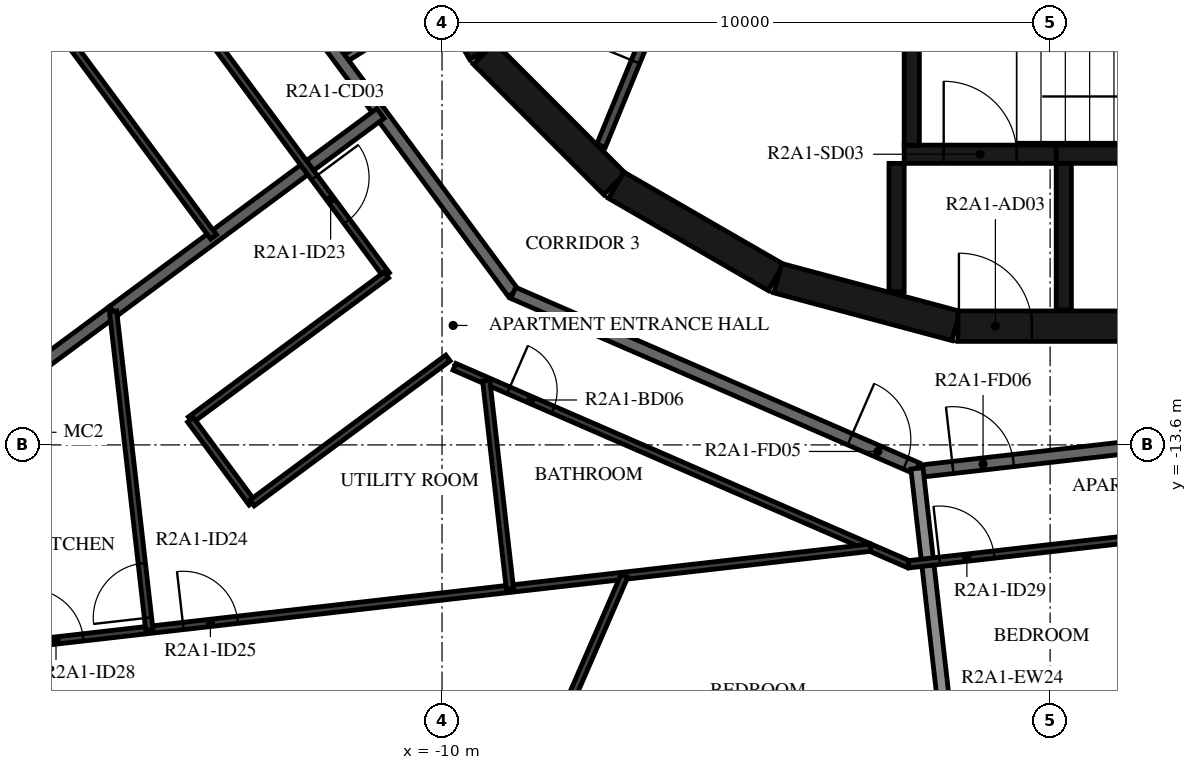
"""IFC4 building model, lengths in metres.
Left out: names, types, materials, properties, quantities, classifications, styles, units other than length and angle.
Written with IfcOpenShell. Run it as: python <this file> out.ifc"""

import sys

from ifc_helpers import new_model, si_unit, direction, frame, frame_2d, origin, place, context, subcontext, project, spatial, rectangle, extrude, element, fill, save


model = new_model("IFC4")
c1 = context("Model", 3, precision=1e-05, world=origin(), true_north=direction((0.0, 1.0)))
c2 = subcontext(c1, "Body", "Model", "MODEL_VIEW")
j1 = project(units=[si_unit("LENGTHUNIT", "METRE"), si_unit("PLANEANGLEUNIT", "RADIAN")], contexts=[c1])
p1 = place(None, origin())
s1 = spatial("IfcSite", under=j1, at=p1, CompositionType="ELEMENT")
p2 = place(p1, origin())
s2 = spatial("IfcBuilding", under=s1, at=p2, CompositionType="ELEMENT")
p3 = place(p2, frame((0.0, 0.0, 80.2)))
s3 = spatial("IfcBuildingStorey", under=s2, at=p3, CompositionType="ELEMENT", Elevation=80.2)
p4 = place(p3, frame((-10.845, -4.51, 0.0), z_axis=(0.0, 0.0, 1.0), x_axis=(0.500087131594, -0.865975092491, 0.0)))
e1 = element("IfcWall", 1, at=p4, inside=s3, PredefinedType="SHEAR", context=c2, shape_type="SweptSolid", body=[
    extrude(rectangle(XDim=3.033, YDim=0.5, at=frame_2d((1.516, 0.0))), origin(), (0.0, 0.0, 1.0), 3.12),
])
p5 = place(p3, frame((-9.308, -7.164, 0.0), z_axis=(0.0, 0.0, 1.0), x_axis=(0.707106781187, -0.707106781187, 0.0)))
e2 = element("IfcWall", 2, at=p5, inside=s3, PredefinedType="SHEAR", context=c2, shape_type="SweptSolid", body=[
    extrude(rectangle(XDim=3.032, YDim=0.5, at=frame_2d((1.516, 0.0))), origin(), (0.0, 0.0, 1.0), 3.12),
])
for number, where, z_axis, x_axis in (
    (3, (-7.137, -9.329, 0.0), (0.0, 0.0, 1.0), (0.866, -0.5, 0.0)),
    (4, (-4.479, -10.858, 0.0), (0.0, 0.0, 1.0), (0.966, -0.259, 0.0)),
):
    element("IfcWall", number, at=place(p3, frame(where, z_axis=z_axis, x_axis=x_axis)), inside=s3, PredefinedType="SHEAR", context=c2, shape_type="SweptSolid", body=[
        extrude(rectangle(XDim=3.033, YDim=0.5, at=frame_2d((1.516, 0.0))), origin(), (0.0, 0.0, 1.0), 3.12),
    ])
p6 = place(p3, frame((-1.516, -11.647, 0.0), z_axis=(0.0, 0.0, 1.0), x_axis=(1.0, 0.0, 0.0)))
e5 = element("IfcWall", 5, at=p6, inside=s3, PredefinedType="SHEAR", context=c2, shape_type="SweptSolid", body=[
    extrude(rectangle(XDim=3.033, YDim=0.5, at=frame_2d((1.516, 0.0))), origin(), (0.0, 0.0, 1.0), 3.12),
])
p7 = place(p6, frame((0.016, 0.0, 0.0)))
e6 = element("IfcOpeningElement", 6, at=p7, cuts=e5, PredefinedType="OPENING", context=c2, shape_type="SweptSolid", body=[
    extrude(rectangle(XDim=1.2, YDim=2.1, at=frame_2d((0.6, 1.05))), frame((0.0, 0.26, 0.0), z_axis=(0.0, -1.0, 0.0), x_axis=(1.0, 0.0, 0.0)), (0.0, 0.0, 1.0), 0.52),
])
p8 = place(p3, frame((-2.275, -8.67, 0.0), z_axis=(0.0, 0.0, 1.0), x_axis=(0.0, 1.0, 0.0)))
e7 = element("IfcWall", 7, at=p8, inside=s3, PredefinedType="SHEAR", context=c2, shape_type="SweptSolid", body=[
    extrude(rectangle(XDim=3.32, YDim=0.25, at=frame_2d((1.66, 0.0))), origin(), (0.0, 0.0, 1.0), 3.12),
])
p9 = place(p3, frame((0.1, -8.82, 0.0), z_axis=(0.0, 0.0, 1.0), x_axis=(1.0, 0.0, 0.0)))
e8 = element("IfcWall", 8, at=p9, inside=s3, PredefinedType="SHEAR", context=c2, shape_type="SweptSolid", body=[
    extrude(rectangle(XDim=4.55, YDim=0.3, at=frame_2d((2.275, 0.0))), origin(), (0.0, 0.0, 1.0), 3.12),
])
p10 = place(p3, frame((-2.4, -8.82, 0.0), z_axis=(0.0, 0.0, 1.0), x_axis=(1.0, 0.0, 0.0)))
e9 = element("IfcWall", 9, at=p10, inside=s3, PredefinedType="SHEAR", context=c2, shape_type="SweptSolid", body=[
    extrude(rectangle(XDim=2.5, YDim=0.3, at=frame_2d((1.25, 0.0))), origin(), (0.0, 0.0, 1.0), 3.12),
])
p11 = place(p10, frame((0.65, 0.0, 0.0)))
e10 = element("IfcOpeningElement", 10, at=p11, cuts=e9, PredefinedType="OPENING", context=c2, shape_type="SweptSolid", body=[
    extrude(rectangle(XDim=1.2, YDim=2.1, at=frame_2d((0.6, 1.05))), frame((0.0, 0.16, 0.0), z_axis=(0.0, -1.0, 0.0), x_axis=(1.0, 0.0, 0.0)), (0.0, 0.0, 1.0), 0.32),
])
p12 = place(p3, frame((-2.525, -8.97, 0.0), z_axis=(0.0, 0.0, 1.0), x_axis=(0.0, -1.0, 0.0)))
e11 = element("IfcWall", 11, at=p12, inside=s3, PredefinedType="SHEAR", context=c2, shape_type="SweptSolid", body=[
    extrude(rectangle(XDim=2.11, YDim=0.25, at=frame_2d((1.055, 0.0))), origin(), (0.0, 0.0, 1.0), 3.12),
])
p13 = place(p3, frame((0.225, -8.97, 0.0), z_axis=(0.0, 0.0, 1.0), x_axis=(0.0, -1.0, 0.0)))
e12 = element("IfcWall", 12, at=p13, inside=s3, PredefinedType="SHEAR", context=c2, shape_type="SweptSolid", body=[
    extrude(rectangle(XDim=2.41, YDim=0.25, at=frame_2d((1.205, 0.0))), origin(), (0.0, 0.0, 1.0), 3.12),
])
p14 = place(p3, frame((-7.385, -8.681, 0.0), z_axis=(0.0, 0.0, 1.0), x_axis=(0.379804590409, 0.925066739811, 0.0)))
e13 = element("IfcWall", 13, at=p14, inside=s3, PredefinedType="PARTITIONING", context=c2, shape_type="SweptSolid", body=[
    extrude(rectangle(XDim=3.885, YDim=0.15, at=frame_2d((1.942, 0.0))), origin(), (0.0, 0.0, 1.0), 3.12),
])
p15 = place(p14, frame((1.493, 0.0, 0.0)))
e14 = element("IfcOpeningElement", 14, at=p15, cuts=e13, PredefinedType="OPENING", context=c2, shape_type="SweptSolid", body=[
    extrude(rectangle(XDim=0.9, YDim=2.1, at=frame_2d((0.45, 1.05))), frame((0.0, 0.085, 0.0), z_axis=(0.0, -1.0, 0.0), x_axis=(1.0, 0.0, 0.0)), (0.0, 0.0, 1.0), 0.17),
])
p16 = place(p3, frame((-11.654, -7.282, 0.0), z_axis=(0.0, 0.0, 1.0), x_axis=(0.848117698675, 0.529807860638, 0.0)))
e15 = element("IfcWall", 15, at=p16, inside=s3, PredefinedType="PARTITIONING", context=c2, shape_type="SweptSolid", body=[
    extrude(rectangle(XDim=1.838, YDim=0.12, at=frame_2d((0.919, 0.0))), origin(), (0.0, 0.0, 1.0), 3.12),
])
p17 = place(p16, frame((0.115, 0.0, 0.0)))
e16 = element("IfcOpeningElement", 16, at=p17, cuts=e15, PredefinedType="OPENING", context=c2, shape_type="SweptSolid", body=[
    extrude(rectangle(XDim=1.2, YDim=2.1, at=frame_2d((0.6, 1.05))), frame((0.0, 0.07, 0.0), z_axis=(0.0, -1.0, 0.0), x_axis=(1.0, 0.0, 0.0)), (0.0, 0.0, 1.0), 0.14),
])
p18 = place(p3, frame((-13.196, -5.198, 0.0), z_axis=(0.0, 0.0, 1.0), x_axis=(0.594805187394, -0.803869883159, 0.0)))
e17 = element("IfcWall", 17, at=p18, inside=s3, PredefinedType="STANDARD", context=c2, shape_type="SweptSolid", body=[
    extrude(rectangle(XDim=7.342, YDim=0.2, at=frame_2d((3.671, 0.0))), origin(), (0.0, 0.0, 1.0), 3.12),
])
p19 = place(p3, frame((-8.829, -11.1, 0.0), z_axis=(0.0, 0.0, 1.0), x_axis=(0.917063622491, -0.398740908742, 0.0)))
e18 = element("IfcWall", 18, at=p19, inside=s3, PredefinedType="STANDARD", context=c2, shape_type="SweptSolid", body=[
    extrude(rectangle(XDim=7.24, YDim=0.2, at=frame_2d((3.62, 0.0))), origin(), (0.0, 0.0, 1.0), 3.12),
])
p20 = place(p19, frame((6.04, 0.0, 0.0)))
e19 = element("IfcOpeningElement", 19, at=p20, cuts=e18, PredefinedType="OPENING", context=c2, shape_type="SweptSolid", body=[
    extrude(rectangle(XDim=1.0, YDim=2.1, at=frame_2d((0.5, 1.05))), frame((0.0, 0.11, 0.0), z_axis=(0.0, -1.0, 0.0), x_axis=(1.0, 0.0, 0.0)), (0.0, 0.0, 1.0), 0.22),
])
p21 = place(p3, frame((-2.096, -14.028, 0.0), z_axis=(0.0, 0.0, 1.0), x_axis=(0.993569170114, 0.113226782163, 0.0)))
e20 = element("IfcWall", 20, at=p21, inside=s3, PredefinedType="STANDARD", context=c2, shape_type="SweptSolid", body=[
    extrude(rectangle(XDim=7.342, YDim=0.2, at=frame_2d((3.671, 0.0))), origin(), (0.0, 0.0, 1.0), 3.12),
])
p22 = place(p21, frame((0.5, 0.0, 0.0)))
e21 = element("IfcOpeningElement", 21, at=p22, cuts=e20, PredefinedType="OPENING", context=c2, shape_type="SweptSolid", body=[
    extrude(rectangle(XDim=1.0, YDim=2.1, at=frame_2d((0.5, 1.05))), frame((0.0, 0.11, 0.0), z_axis=(0.0, -1.0, 0.0), x_axis=(1.0, 0.0, 0.0)), (0.0, 0.0, 1.0), 0.22),
])
p23 = place(p3, frame((-15.41, -11.403, 0.0), z_axis=(0.0, 0.0, 1.0), x_axis=(0.803887568227, 0.594781285558, 0.0)))
e22 = element("IfcWall", 22, at=p23, inside=s3, PredefinedType="STANDARD", context=c2, shape_type="SweptSolid", body=[
    extrude(rectangle(XDim=5.47, YDim=0.2, at=frame_2d((2.735, 0.0))), origin(), (0.0, 0.0, 1.0), 3.12),
])
p24 = place(p3, frame((-16.649, -12.32, 0.0), z_axis=(0.0, 0.0, 1.0), x_axis=(0.803804030903, 0.594894175383, 0.0)))
e23 = element("IfcWall", 23, at=p24, inside=s3, PredefinedType="STANDARD", context=c2, shape_type="SweptSolid", body=[
    extrude(rectangle(XDim=1.542, YDim=0.2, at=frame_2d((0.771, 0.0))), origin(), (0.0, 0.0, 1.0), 3.12),
])
p25 = place(p3, frame((-1.555, -19.559, 0.0), z_axis=(0.0, 0.0, 1.0), x_axis=(-0.113221250863, 0.993569800443, 0.0)))
e24 = element("IfcWall", 24, at=p25, inside=s3, PredefinedType="STANDARD", context=c2, shape_type="SweptSolid", body=[
    extrude(rectangle(XDim=5.609, YDim=0.2, at=frame_2d((2.804, 0.0))), origin(), (0.0, 0.0, 1.0), 2.73),
])
p26 = place(p3, frame((-14.641, -5.767, 0.0), z_axis=(0.0, 0.0, 1.0), x_axis=(0.594825885962, -0.803854567313, 0.0)))
e25 = element("IfcWall", 25, at=p26, inside=s3, PredefinedType="PARTITIONING", context=c2, shape_type="SweptSolid", body=[
    extrude(rectangle(XDim=6.266, YDim=0.12, at=frame_2d((3.133, 0.0))), origin(), (0.0, 0.0, 1.0), 3.12),
])
p27 = place(p26, frame((4.273, 0.0, 0.0)))
e26 = element("IfcOpeningElement", 26, at=p27, cuts=e25, PredefinedType="OPENING", context=c2, shape_type="SweptSolid", body=[
    extrude(rectangle(XDim=0.9, YDim=2.1, at=frame_2d((0.45, 1.05))), frame((0.0, 0.07, 0.0), z_axis=(0.0, -1.0, 0.0), x_axis=(1.0, 0.0, 0.0)), (0.0, 0.0, 1.0), 0.14),
])
p28 = place(p3, frame((-18.084, -4.331, 0.0), z_axis=(0.0, 0.0, 1.0), x_axis=(0.594811782108, -0.803865003508, 0.0)))
e27 = element("IfcWall", 27, at=p28, inside=s3, PredefinedType="PARTITIONING", context=c2, shape_type="SweptSolid", body=[
    extrude(rectangle(XDim=7.276, YDim=0.12, at=frame_2d((3.638, 0.0))), origin(), (0.0, 0.0, 1.0), 3.12),
])
p29 = place(p3, frame((-10.914, -10.804, 0.0), z_axis=(0.0, 0.0, 1.0), x_axis=(-0.803864616889, -0.594812304609, 0.0)))
e28 = element("IfcWall", 28, at=p29, inside=s3, PredefinedType="PARTITIONING", context=c2, shape_type="SweptSolid", body=[
    extrude(rectangle(XDim=4.008, YDim=0.12, at=frame_2d((2.004, 0.0))), origin(), (0.0, 0.0, 1.0), 3.12),
])
p30 = place(p3, frame((-14.136, -13.188, 0.0), z_axis=(0.0, 0.0, 1.0), x_axis=(0.594863421241, -0.803826791087, 0.0)))
e29 = element("IfcWall", 29, at=p30, inside=s3, PredefinedType="PARTITIONING", context=c2, shape_type="SweptSolid", body=[
    extrude(rectangle(XDim=1.7, YDim=0.12, at=frame_2d((0.85, 0.0))), origin(), (0.0, 0.0, 1.0), 3.12),
])
p31 = place(p3, frame((-13.125, -14.555, 0.0), z_axis=(0.0, 0.0, 1.0), x_axis=(0.80389374229, 0.594772940799, 0.0)))
e30 = element("IfcWall", 30, at=p31, inside=s3, PredefinedType="PARTITIONING", context=c2, shape_type="SweptSolid", body=[
    extrude(rectangle(XDim=4.008, YDim=0.12, at=frame_2d((2.004, 0.0))), origin(), (0.0, 0.0, 1.0), 3.12),
])
p32 = place(p3, frame((-9.796, -12.315, 0.0), z_axis=(0.0, 0.0, 1.0), x_axis=(0.917059572812, -0.398750222463, 0.0)))
e31 = element("IfcWall", 31, at=p32, inside=s3, PredefinedType="PARTITIONING", context=c2, shape_type="SweptSolid", body=[
    extrude(rectangle(XDim=8.146, YDim=0.12, at=frame_2d((4.073, 0.0))), origin(), (0.0, 0.0, 1.0), 3.12),
])
p33 = place(p32, frame((0.969, 0.0, 0.0)))
e32 = element("IfcOpeningElement", 32, at=p33, cuts=e31, PredefinedType="OPENING", context=c2, shape_type="SweptSolid", body=[
    extrude(rectangle(XDim=0.8, YDim=2.1, at=frame_2d((0.4, 1.05))), frame((0.0, 0.07, 0.0), z_axis=(0.0, -1.0, 0.0), x_axis=(1.0, 0.0, 0.0)), (0.0, 0.0, 1.0), 0.14),
])
p34 = place(p3, frame((-2.326, -15.563, 0.0), z_axis=(0.0, 0.0, 1.0), x_axis=(0.993575068384, 0.113175012641, 0.0)))
e33 = element("IfcWall", 33, at=p34, inside=s3, PredefinedType="PARTITIONING", context=c2, shape_type="SweptSolid", body=[
    extrude(rectangle(XDim=3.799, YDim=0.12, at=frame_2d((1.899, 0.0))), origin(), (0.0, 0.0, 1.0), 3.12),
])
p35 = place(p34, frame((0.513, 0.0, 0.0)))
e34 = element("IfcOpeningElement", 34, at=p35, cuts=e33, PredefinedType="OPENING", context=c2, shape_type="SweptSolid", body=[
    extrude(rectangle(XDim=0.9, YDim=2.1, at=frame_2d((0.45, 1.05))), frame((0.0, 0.07, 0.0), z_axis=(0.0, -1.0, 0.0), x_axis=(1.0, 0.0, 0.0)), (0.0, 0.0, 1.0), 0.14),
])
p36 = place(p3, frame((-17.437, -16.94, 0.0), z_axis=(0.0, 0.0, 1.0), x_axis=(0.993573314119, 0.113190412448, 0.0)))
e35 = element("IfcWall", 35, at=p36, inside=s3, PredefinedType="PARTITIONING", context=c2, shape_type="SweptSolid", body=[
    extrude(rectangle(XDim=14.576, YDim=0.12, at=frame_2d((7.288, 0.0))), origin(), (0.0, 0.0, 1.0), 3.12),
])
p37 = place(p36, frame((3.201, 0.0, 0.0)))
e36 = element("IfcOpeningElement", 36, at=p37, cuts=e35, PredefinedType="OPENING", context=c2, shape_type="SweptSolid", body=[
    extrude(rectangle(XDim=0.9, YDim=2.1, at=frame_2d((0.45, 1.05))), frame((0.0, 0.07, 0.0), z_axis=(0.0, -1.0, 0.0), x_axis=(1.0, 0.0, 0.0)), (0.0, 0.0, 1.0), 0.14),
])
p38 = place(p36, frame((0.645, 0.0, 0.0)))
e37 = element("IfcOpeningElement", 37, at=p38, cuts=e35, PredefinedType="OPENING", context=c2, shape_type="SweptSolid", body=[
    extrude(rectangle(XDim=0.9, YDim=2.1, at=frame_2d((0.45, 1.05))), frame((0.0, 0.07, 0.0), z_axis=(0.0, -1.0, 0.0), x_axis=(1.0, 0.0, 0.0)), (0.0, 0.0, 1.0), 0.14),
])
p39 = place(p3, frame((-14.813, -16.641, 0.0), z_axis=(0.0, 0.0, 1.0), x_axis=(-0.113210971478, 0.993570971767, 0.0)))
e38 = element("IfcWall", 38, at=p39, inside=s3, PredefinedType="PARTITIONING", context=c2, shape_type="SweptSolid", body=[
    extrude(rectangle(XDim=5.273, YDim=0.12, at=frame_2d((2.636, 0.0))), origin(), (0.0, 0.0, 1.0), 3.12),
])
p40 = place(p39, frame((0.2, 0.0, 0.0)))
e39 = element("IfcOpeningElement", 39, at=p40, cuts=e38, PredefinedType="OPENING", context=c2, shape_type="SweptSolid", body=[
    extrude(rectangle(XDim=0.9, YDim=2.1, at=frame_2d((0.45, 1.05))), frame((0.0, 0.07, 0.0), z_axis=(0.0, -1.0, 0.0), x_axis=(1.0, 0.0, 0.0)), (0.0, 0.0, 1.0), 0.14),
])
p41 = place(p3, frame((-8.884, -15.966, 0.0), z_axis=(0.0, 0.0, 1.0), x_axis=(-0.113230836929, 0.993568708026, 0.0)))
e40 = element("IfcWall", 40, at=p41, inside=s3, PredefinedType="PARTITIONING", context=c2, shape_type="SweptSolid", body=[
    extrude(rectangle(XDim=3.446, YDim=0.12, at=frame_2d((1.723, 0.0))), origin(), (0.0, 0.0, 1.0), 3.12),
])
p42 = place(p3, frame((-9.026, -20.41, 0.0), z_axis=(0.0, 0.0, 1.0), x_axis=(0.398750711167, 0.917059360316, 0.0)))
e41 = element("IfcWall", 41, at=p42, inside=s3, PredefinedType="PARTITIONING", context=c2, shape_type="SweptSolid", body=[
    extrude(rectangle(XDim=5.081, YDim=0.12, at=frame_2d((2.54, 0.0))), origin(), (0.0, 0.0, 1.0), 3.12),
])
p43 = place(p42, frame((0.4, 0.0, 0.0)))
e42 = element("IfcOpeningElement", 42, at=p43, cuts=e41, PredefinedType="OPENING", context=c2, shape_type="SweptSolid", body=[
    extrude(rectangle(XDim=0.9, YDim=2.1, at=frame_2d((0.45, 1.05))), frame((0.0, 0.07, 0.0), z_axis=(0.0, -1.0, 0.0), x_axis=(1.0, 0.0, 0.0)), (0.0, 0.0, 1.0), 0.14),
])
p44 = place(p11, origin())
e43 = element("IfcDoor", 43, at=p44, inside=s3, OperationType="SINGLE_SWING_LEFT", PredefinedType="DOOR", context=c2, shape_type="SweptSolid", body=[
    extrude(rectangle(XDim=1.2, YDim=2.1, at=frame_2d((0.6, 1.05))), frame((0.0, 0.025, 0.0), z_axis=(0.0, -1.0, 0.0), x_axis=(1.0, 0.0, 0.0)), (0.0, 0.0, 1.0), 0.05),
])
fill(e10, e43)
p45 = place(p7, origin())
e44 = element("IfcDoor", 44, at=p45, inside=s3, OperationType="SINGLE_SWING_RIGHT", PredefinedType="DOOR", context=c2, shape_type="SweptSolid", body=[
    extrude(rectangle(XDim=1.2, YDim=2.1, at=frame_2d((0.6, 1.05))), frame((0.0, 0.025, 0.0), z_axis=(0.0, -1.0, 0.0), x_axis=(1.0, 0.0, 0.0)), (0.0, 0.0, 1.0), 0.05),
])
fill(e6, e44)
p46 = place(p15, origin())
e45 = element("IfcDoor", 45, at=p46, inside=s3, OperationType="SINGLE_SWING_LEFT", PredefinedType="DOOR", context=c2, shape_type="SweptSolid", body=[
    extrude(rectangle(XDim=0.9, YDim=2.1, at=frame_2d((0.45, 1.05))), frame((0.0, 0.025, 0.0), z_axis=(0.0, -1.0, 0.0), x_axis=(1.0, 0.0, 0.0)), (0.0, 0.0, 1.0), 0.05),
])
fill(e14, e45)
p47 = place(p20, origin())
e46 = element("IfcDoor", 46, at=p47, inside=s3, OperationType="SINGLE_SWING_LEFT", PredefinedType="DOOR", context=c2, shape_type="SweptSolid", body=[
    extrude(rectangle(XDim=1.0, YDim=2.1, at=frame_2d((0.5, 1.05))), frame((0.0, 0.025, 0.0), z_axis=(0.0, -1.0, 0.0), x_axis=(1.0, 0.0, 0.0)), (0.0, 0.0, 1.0), 0.05),
])
fill(e19, e46)
p48 = place(p27, origin())
e47 = element("IfcDoor", 47, at=p48, inside=s3, OperationType="SINGLE_SWING_LEFT", PredefinedType="DOOR", context=c2, shape_type="SweptSolid", body=[
    extrude(rectangle(XDim=0.9, YDim=2.1, at=frame_2d((0.45, 1.05))), frame((0.0, 0.025, 0.0), z_axis=(0.0, -1.0, 0.0), x_axis=(1.0, 0.0, 0.0)), (0.0, 0.0, 1.0), 0.05),
])
fill(e26, e47)
p49 = place(p33, origin())
e48 = element("IfcDoor", 48, at=p49, inside=s3, OperationType="SINGLE_SWING_LEFT", PredefinedType="DOOR", context=c2, shape_type="SweptSolid", body=[
    extrude(rectangle(XDim=0.8, YDim=2.1, at=frame_2d((0.4, 1.05))), frame((0.0, 0.025, 0.0), z_axis=(0.0, -1.0, 0.0), x_axis=(1.0, 0.0, 0.0)), (0.0, 0.0, 1.0), 0.05),
])
fill(e32, e48)
p50 = place(p40, origin())
e49 = element("IfcDoor", 49, at=p50, inside=s3, OperationType="SINGLE_SWING_LEFT", PredefinedType="DOOR", context=c2, shape_type="SweptSolid", body=[
    extrude(rectangle(XDim=0.9, YDim=2.1, at=frame_2d((0.45, 1.05))), frame((0.0, 0.025, 0.0), z_axis=(0.0, -1.0, 0.0), x_axis=(1.0, 0.0, 0.0)), (0.0, 0.0, 1.0), 0.05),
])
fill(e39, e49)
p51 = place(p37, origin())
e50 = element("IfcDoor", 50, at=p51, inside=s3, OperationType="SINGLE_SWING_LEFT", PredefinedType="DOOR", context=c2, shape_type="SweptSolid", body=[
    extrude(rectangle(XDim=0.9, YDim=2.1, at=frame_2d((0.45, 1.05))), frame((0.0, 0.025, 0.0), z_axis=(0.0, -1.0, 0.0), x_axis=(1.0, 0.0, 0.0)), (0.0, 0.0, 1.0), 0.05),
])
fill(e36, e50)
p52 = place(p38, origin())
e51 = element("IfcDoor", 51, at=p52, inside=s3, OperationType="SINGLE_SWING_RIGHT", PredefinedType="DOOR", context=c2, shape_type="SweptSolid", body=[
    extrude(rectangle(XDim=0.9, YDim=2.1, at=frame_2d((0.45, 1.05))), frame((0.0, 0.025, 0.0), z_axis=(0.0, -1.0, 0.0), x_axis=(1.0, 0.0, 0.0)), (0.0, 0.0, 1.0), 0.05),
])
fill(e37, e51)
p53 = place(p22, origin())
e52 = element("IfcDoor", 52, at=p53, inside=s3, OperationType="SINGLE_SWING_LEFT", PredefinedType="DOOR", context=c2, shape_type="SweptSolid", body=[
    extrude(rectangle(XDim=1.0, YDim=2.1, at=frame_2d((0.5, 1.05))), frame((0.0, 0.025, 0.0), z_axis=(0.0, -1.0, 0.0), x_axis=(1.0, 0.0, 0.0)), (0.0, 0.0, 1.0), 0.05),
])
fill(e21, e52)
p54 = place(p35, origin())
e53 = element("IfcDoor", 53, at=p54, inside=s3, OperationType="SINGLE_SWING_LEFT", PredefinedType="DOOR", context=c2, shape_type="SweptSolid", body=[
    extrude(rectangle(XDim=0.9, YDim=2.1, at=frame_2d((0.45, 1.05))), frame((0.0, 0.025, 0.0), z_axis=(0.0, -1.0, 0.0), x_axis=(1.0, 0.0, 0.0)), (0.0, 0.0, 1.0), 0.05),
])
fill(e34, e53)
p55 = place(p17, origin())
e54 = element("IfcDoor", 54, at=p55, inside=s3, OperationType="DOUBLE_DOOR_SINGLE_SWING", PredefinedType="DOOR", context=c2, shape_type="SweptSolid", body=[
    extrude(rectangle(XDim=1.2, YDim=2.1, at=frame_2d((0.6, 1.05))), frame((0.0, 0.025, 0.0), z_axis=(0.0, -1.0, 0.0), x_axis=(1.0, 0.0, 0.0)), (0.0, 0.0, 1.0), 0.05),
])
fill(e16, e54)
save(model, sys.argv[1])
